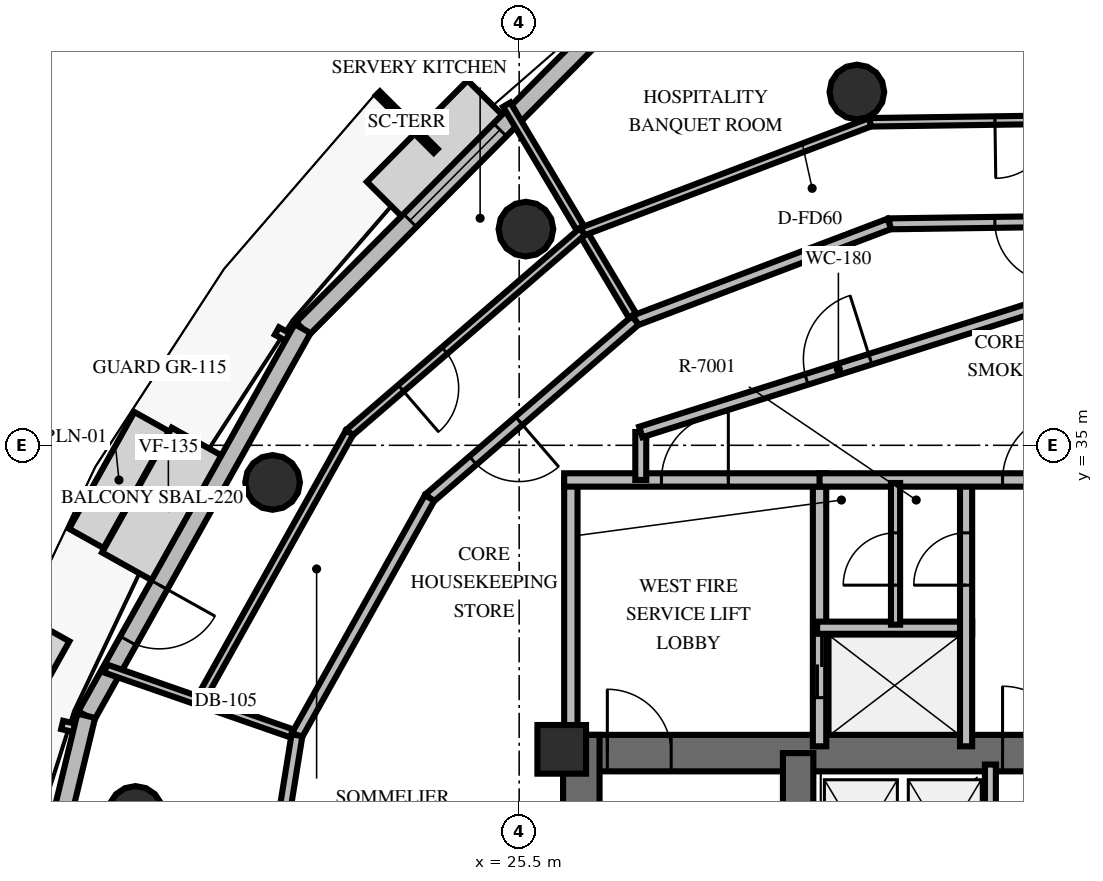
"""IFC4 building model, lengths in metres.
Left out: names, types, materials, properties, quantities, classifications, styles, units other than length and angle.
Written with IfcOpenShell. Run it as: python <this file> out.ifc"""

import sys

from ifc_helpers import new_model, si_unit, direction, frame, frame_2d, origin, origin_2d, place, context, subcontext, project, spatial, rectangle, circle, extrude, element, fill, save


model = new_model("IFC4")
c1 = context("Model", 3, precision=1e-05, world=origin(), true_north=direction((0.0, 1.0)))
c2 = subcontext(c1, "Body", "Model", "MODEL_VIEW")
j1 = project(units=[si_unit("LENGTHUNIT", "METRE"), si_unit("PLANEANGLEUNIT", "RADIAN")], contexts=[c1])
p1 = place(None, origin())
s1 = spatial("IfcSite", under=j1, at=p1, CompositionType="ELEMENT")
p2 = place(p1, origin())
s2 = spatial("IfcBuilding", under=s1, at=p2, CompositionType="ELEMENT")
p3 = place(p2, frame((0.0, 0.0, 280.8)))
s3 = spatial("IfcBuildingStorey", under=s2, at=p3, CompositionType="ELEMENT", Elevation=280.8)
p4 = place(p3, frame((26.222, 29.938, 0.0), z_axis=(0.0, 0.0, 1.0), x_axis=(1.0, 0.0, 0.0)))
e1 = element("IfcWall", 1, at=p4, inside=s3, PredefinedType="SHEAR", context=c2, shape_type="SweptSolid", body=[
    extrude(rectangle(XDim=15.566, YDim=0.6, at=frame_2d((7.783, 0.0))), origin(), (0.0, 0.0, 1.0), 3.6),
])
p5 = place(p4, frame((0.728, 0.0, 0.0)))
e2 = element("IfcOpeningElement", 2, at=p5, cuts=e1, PredefinedType="OPENING", context=c2, shape_type="SweptSolid", body=[
    extrude(rectangle(XDim=1.05, YDim=2.15, at=frame_2d((0.525, 1.075))), frame((0.0, 0.31, 0.0), z_axis=(0.0, -1.0, 0.0), x_axis=(1.0, 0.0, 0.0)), (0.0, 0.0, 1.0), 0.62),
])
p6 = place(p4, frame((13.778, 0.0, 0.0)))
e3 = element("IfcOpeningElement", 3, at=p6, cuts=e1, PredefinedType="OPENING", context=c2, shape_type="SweptSolid", body=[
    extrude(rectangle(XDim=1.05, YDim=2.15, at=frame_2d((0.525, 1.075))), frame((0.0, 0.31, 0.0), z_axis=(0.0, -1.0, 0.0), x_axis=(1.0, 0.0, 0.0)), (0.0, 0.0, 1.0), 0.62),
])
p7 = place(p4, frame((7.228, 0.0, 0.0)))
e4 = element("IfcOpeningElement", 4, at=p7, cuts=e1, PredefinedType="OPENING", context=c2, shape_type="SweptSolid", body=[
    extrude(rectangle(XDim=1.1, YDim=2.15, at=frame_2d((0.55, 1.075))), frame((0.0, 0.31, 0.0), z_axis=(0.0, -1.0, 0.0), x_axis=(1.0, 0.0, 0.0)), (0.0, 0.0, 1.0), 0.62),
])
p8 = place(p3, frame((26.522, 19.962, 0.0), z_axis=(0.0, 0.0, 1.0), x_axis=(0.0, 1.0, 0.0)))
e5 = element("IfcWall", 5, at=p8, inside=s3, PredefinedType="SHEAR", context=c2, shape_type="SweptSolid", body=[
    extrude(rectangle(XDim=10.276, YDim=0.6, at=frame_2d((5.138, 0.0))), origin(), (0.0, 0.0, 1.0), 3.6),
])
p9 = place(p3, frame((30.088, 20.262, 0.0), z_axis=(0.0, 0.0, 1.0), x_axis=(0.0, 1.0, 0.0)))
e6 = element("IfcWall", 6, at=p9, inside=s3, PredefinedType="SHEAR", context=c2, shape_type="SweptSolid", body=[
    extrude(rectangle(XDim=9.676, YDim=0.5, at=frame_2d((4.838, 0.0))), origin(), (0.0, 0.0, 1.0), 3.6),
])
p10 = place(p3, frame((26.2, 30.0, 0.0), z_axis=(0.0, 0.0, 1.0), x_axis=(1.0, 0.0, 0.0)))
e7 = element("IfcColumn", 7, at=p10, inside=s3, PredefinedType="PILASTER", context=c2, shape_type="SweptSolid", body=[
    extrude(rectangle(XDim=0.8, YDim=0.8, at=origin_2d()), origin(), (0.0, 0.0, 1.0), 3.6),
])
for number, where, z_axis, x_axis in (
    (8, (31.054, 40.81, 0.0), (0.0, 0.0, 1.0), (1.0, 0.0, 0.0)),
    (9, (25.611, 38.555, 0.0), (0.0, 0.0, 1.0), (1.0, 0.0, 0.0)),
    (10, (21.445, 34.389, 0.0), (0.0, 0.0, 1.0), (1.0, 0.0, 0.0)),
    (11, (19.19, 28.946, 0.0), (0.0, 0.0, 1.0), (1.0, 0.0, 0.0)),
):
    element("IfcColumn", number, at=place(p3, frame(where, z_axis=z_axis, x_axis=x_axis)), inside=s3, PredefinedType="COLUMN", context=c2, shape_type="SweptSolid", body=[
        extrude(circle(Radius=0.45, at=origin_2d()), origin(), (0.0, 0.0, 1.0), 3.6),
    ])
p11 = place(p3, frame((26.951, 41.968, 0.0), z_axis=(0.0, 0.0, 1.0), x_axis=(-0.704528696966, -0.709675499895, 0.0)))
e12 = element("IfcWall", 12, at=p11, inside=s3, PredefinedType="SOLIDWALL", context=c2, shape_type="SweptSolid", body=[
    extrude(rectangle(XDim=7.115, YDim=0.3, at=frame_2d((3.558, 0.0))), origin(), (0.0, 0.0, 1.0), 2.76),
])
p12 = place(p11, frame((2.508, 0.0, 0.8)))
e13 = element("IfcOpeningElement", 13, at=p12, cuts=e12, PredefinedType="OPENING", context=c2, shape_type="SweptSolid", body=[
    extrude(rectangle(XDim=2.1, YDim=1.85, at=frame_2d((1.05, 0.925))), frame((0.0, 0.16, 0.0), z_axis=(0.0, -1.0, 0.0), x_axis=(1.0, 0.0, 0.0)), (0.0, 0.0, 1.0), 0.32),
])
p13 = place(p3, frame((21.938, 36.918, 0.0), z_axis=(0.0, 0.0, 1.0), x_axis=(-0.487861120846, -0.872921260348, 0.0)))
e14 = element("IfcWall", 14, at=p13, inside=s3, PredefinedType="SOLIDWALL", context=c2, shape_type="SweptSolid", body=[
    extrude(rectangle(XDim=7.293, YDim=0.3, at=frame_2d((3.646, 0.0))), origin(), (0.0, 0.0, 1.0), 2.76),
])
p14 = place(p13, frame((4.83, 0.0, 0.0)))
e15 = element("IfcOpeningElement", 15, at=p14, cuts=e14, PredefinedType="OPENING", context=c2, shape_type="SweptSolid", body=[
    extrude(rectangle(XDim=1.05, YDim=2.15, at=frame_2d((0.525, 1.075))), frame((0.0, 0.16, 0.0), z_axis=(0.0, -1.0, 0.0), x_axis=(1.0, 0.0, 0.0)), (0.0, 0.0, 1.0), 0.32),
])
p15 = place(p3, frame((18.38, 30.552, 0.0), z_axis=(0.0, 0.0, 1.0), x_axis=(-0.235278882534, -0.971927902385, 0.0)))
e16 = element("IfcWall", 16, at=p15, inside=s3, PredefinedType="SOLIDWALL", context=c2, shape_type="SweptSolid", body=[
    extrude(rectangle(XDim=7.115, YDim=0.3, at=frame_2d((3.558, 0.0))), origin(), (0.0, 0.0, 1.0), 2.76),
])
p16 = place(p15, frame((2.508, 0.0, 0.8)))
e17 = element("IfcOpeningElement", 17, at=p16, cuts=e16, PredefinedType="OPENING", context=c2, shape_type="SweptSolid", body=[
    extrude(rectangle(XDim=2.1, YDim=1.85, at=frame_2d((1.05, 0.925))), frame((0.0, 0.16, 0.0), z_axis=(0.0, -1.0, 0.0), x_axis=(1.0, 0.0, 0.0)), (0.0, 0.0, 1.0), 0.32),
])
p17 = place(p3, frame((26.35, 30.05, 0.0), z_axis=(0.0, 0.0, 1.0), x_axis=(0.0, 1.0, 0.0)))
e18 = element("IfcWall", 18, at=p17, inside=s3, PredefinedType="SOLIDWALL", context=c2, shape_type="SweptSolid", body=[
    extrude(rectangle(XDim=4.38, YDim=0.22, at=frame_2d((2.19, 0.0))), origin(), (0.0, 0.0, 1.0), 2.46),
])
p18 = place(p3, frame((30.44, 30.05, 0.0), z_axis=(0.0, 0.0, 1.0), x_axis=(0.0, 1.0, 0.0)))
e19 = element("IfcWall", 19, at=p18, inside=s3, PredefinedType="SOLIDWALL", context=c2, shape_type="SweptSolid", body=[
    extrude(rectangle(XDim=4.38, YDim=0.22, at=frame_2d((2.19, 0.0))), origin(), (0.0, 0.0, 1.0), 2.46),
])
p19 = place(p18, frame((0.8, 0.0, 0.0)))
e20 = element("IfcOpeningElement", 20, at=p19, cuts=e19, PredefinedType="OPENING", context=c2, shape_type="SweptSolid", body=[
    extrude(rectangle(XDim=1.05, YDim=2.1, at=frame_2d((0.525, 1.05))), frame((0.0, 0.12, 0.0), z_axis=(0.0, -1.0, 0.0), x_axis=(1.0, 0.0, 0.0)), (0.0, 0.0, 1.0), 0.24),
])
p20 = place(p3, frame((26.24, 34.43, 0.0), z_axis=(0.0, 0.0, 1.0), x_axis=(1.0, 0.0, 0.0)))
e21 = element("IfcWall", 21, at=p20, inside=s3, PredefinedType="SOLIDWALL", context=c2, shape_type="SweptSolid", body=[
    extrude(rectangle(XDim=4.31, YDim=0.22, at=frame_2d((2.155, 0.0))), origin(), (0.0, 0.0, 1.0), 2.46),
])
p21 = place(p20, frame((1.6, 0.0, 0.0)))
e22 = element("IfcOpeningElement", 22, at=p21, cuts=e21, PredefinedType="OPENING", context=c2, shape_type="SweptSolid", body=[
    extrude(rectangle(XDim=1.1, YDim=2.15, at=frame_2d((0.55, 1.075))), frame((0.0, 0.12, 0.0), z_axis=(0.0, -1.0, 0.0), x_axis=(1.0, 0.0, 0.0)), (0.0, 0.0, 1.0), 0.24),
])
p22 = place(p3, frame((30.4, 32.0, 0.0), z_axis=(0.0, 0.0, 1.0), x_axis=(1.0, 0.0, 0.0)))
e23 = element("IfcWall", 23, at=p22, inside=s3, PredefinedType="SOLIDWALL", context=c2, shape_type="SweptSolid", body=[
    extrude(rectangle(XDim=2.55, YDim=0.2, at=frame_2d((1.275, 0.0))), origin(), (0.0, 0.0, 1.0), 2.46),
])
p23 = place(p3, frame((32.85, 30.05, 0.0), z_axis=(0.0, 0.0, 1.0), x_axis=(0.0, 1.0, 0.0)))
e24 = element("IfcWall", 24, at=p23, inside=s3, PredefinedType="SOLIDWALL", context=c2, shape_type="SweptSolid", body=[
    extrude(rectangle(XDim=4.38, YDim=0.2, at=frame_2d((2.19, 0.0))), origin(), (0.0, 0.0, 1.0), 2.46),
])
p24 = place(p23, frame((2.65, 0.0, 0.0)))
e25 = element("IfcOpeningElement", 25, at=p24, cuts=e24, PredefinedType="OPENING", context=c2, shape_type="SweptSolid", body=[
    extrude(rectangle(XDim=0.86, YDim=2.05, at=frame_2d((0.43, 1.025))), frame((0.0, 0.11, 0.0), z_axis=(0.0, -1.0, 0.0), x_axis=(1.0, 0.0, 0.0)), (0.0, 0.0, 1.0), 0.22),
])
p25 = place(p3, frame((30.44, 34.43, 0.0), z_axis=(0.0, 0.0, 1.0), x_axis=(1.0, 0.0, 0.0)))
e26 = element("IfcWall", 26, at=p25, inside=s3, PredefinedType="SOLIDWALL", context=c2, shape_type="SweptSolid", body=[
    extrude(rectangle(XDim=7.12, YDim=0.22, at=frame_2d((3.56, 0.0))), origin(), (0.0, 0.0, 1.0), 2.46),
])
p26 = place(p25, frame((3.01, 0.0, 0.0)))
e27 = element("IfcOpeningElement", 27, at=p26, cuts=e26, PredefinedType="OPENING", context=c2, shape_type="SweptSolid", body=[
    extrude(rectangle(XDim=1.1, YDim=2.15, at=frame_2d((0.55, 1.075))), frame((0.0, 0.12, 0.0), z_axis=(0.0, -1.0, 0.0), x_axis=(1.0, 0.0, 0.0)), (0.0, 0.0, 1.0), 0.24),
])
p27 = place(p3, frame((31.69, 32.05, 0.0), z_axis=(0.0, 0.0, 1.0), x_axis=(0.0, 1.0, 0.0)))
e28 = element("IfcWall", 28, at=p27, inside=s3, PredefinedType="PARTITIONING", context=c2, shape_type="SweptSolid", body=[
    extrude(rectangle(XDim=2.33, YDim=0.15, at=frame_2d((1.165, 0.0))), origin(), (0.0, 0.0, 1.0), 2.46),
])
p28 = place(p27, frame((0.65, 0.0, 0.0)))
e29 = element("IfcOpeningElement", 29, at=p28, cuts=e28, PredefinedType="OPENING", context=c2, shape_type="SweptSolid", body=[
    extrude(rectangle(XDim=0.86, YDim=2.05, at=frame_2d((0.43, 1.025))), frame((0.0, 0.085, 0.0), z_axis=(0.0, -1.0, 0.0), x_axis=(1.0, 0.0, 0.0)), (0.0, 0.0, 1.0), 0.17),
])
p29 = place(p3, frame((33.25, 27.28, 0.0), z_axis=(0.0, 0.0, 1.0), x_axis=(0.0, 1.0, 0.0)))
e30 = element("IfcWall", 30, at=p29, inside=s3, PredefinedType="SOLIDWALL", context=c2, shape_type="SweptSolid", body=[
    extrude(rectangle(XDim=2.47, YDim=0.18, at=frame_2d((1.235, 0.0))), origin(), (0.0, 0.0, 1.0), 2.46),
])
p30 = place(p3, frame((27.5, 34.43, 0.0), z_axis=(0.0, 0.0, 1.0), x_axis=(0.0, 1.0, 0.0)))
e31 = element("IfcWall", 31, at=p30, inside=s3, PredefinedType="PARTITIONING", context=c2, shape_type="SweptSolid", body=[
    extrude(rectangle(XDim=0.789, YDim=0.18, at=frame_2d((0.395, 0.0))), origin(), (0.0, 0.0, 1.0), 2.46),
])
p31 = place(p3, frame((27.5, 35.219, 0.0), z_axis=(0.0, 0.0, 1.0), x_axis=(0.953228121756, 0.302251795518, 0.0)))
e32 = element("IfcWall", 32, at=p31, inside=s3, PredefinedType="PARTITIONING", context=c2, shape_type="SweptSolid", body=[
    extrude(rectangle(XDim=6.819, YDim=0.18, at=frame_2d((3.409, 0.0))), origin(), (0.0, 0.0, 1.0), 2.46),
])
p32 = place(p31, frame((2.86, 0.0, 0.0)))
e33 = element("IfcOpeningElement", 33, at=p32, cuts=e32, PredefinedType="OPENING", context=c2, shape_type="SweptSolid", body=[
    extrude(rectangle(XDim=1.1, YDim=2.15, at=frame_2d((0.55, 1.075))), frame((0.0, 0.1, 0.0), z_axis=(0.0, -1.0, 0.0), x_axis=(1.0, 0.0, 0.0)), (0.0, 0.0, 1.0), 0.2),
])
p33 = place(p3, frame((27.41, 37.055, 0.0), z_axis=(0.0, 0.0, 1.0), x_axis=(-0.512015892625, 0.858975975042, 0.0)))
e34 = element("IfcWall", 34, at=p33, inside=s3, PredefinedType="PARTITIONING", context=c2, shape_type="SweptSolid", body=[
    extrude(rectangle(XDim=4.13, YDim=0.14, at=frame_2d((2.065, 0.0))), origin(), (0.0, 0.0, 1.0), 2.46),
])
p34 = place(p3, frame((36.058, 38.704, 0.0), z_axis=(0.0, 0.0, 1.0), x_axis=(-0.99990299363, -0.013928507778, 0.0)))
e35 = element("IfcWall", 35, at=p34, inside=s3, PredefinedType="PARTITIONING", context=c2, shape_type="SweptSolid", body=[
    extrude(rectangle(XDim=4.47, YDim=0.18, at=frame_2d((2.235, 0.0))), origin(), (0.0, 0.0, 1.0), 2.46),
])
p35 = place(p34, frame((1.735, 0.0, 0.0)))
e36 = element("IfcOpeningElement", 36, at=p35, cuts=e35, PredefinedType="OPENING", context=c2, shape_type="SweptSolid", body=[
    extrude(rectangle(XDim=1.0, YDim=2.15, at=frame_2d((0.5, 1.075))), frame((0.0, 0.1, 0.0), z_axis=(0.0, -1.0, 0.0), x_axis=(1.0, 0.0, 0.0)), (0.0, 0.0, 1.0), 0.2),
])
p36 = place(p3, frame((31.588, 38.642, 0.0), z_axis=(0.0, 0.0, 1.0), x_axis=(-0.934814409171, -0.355136622169, 0.0)))
e37 = element("IfcWall", 37, at=p36, inside=s3, PredefinedType="PARTITIONING", context=c2, shape_type="SweptSolid", body=[
    extrude(rectangle(XDim=4.47, YDim=0.18, at=frame_2d((2.235, 0.0))), origin(), (0.0, 0.0, 1.0), 2.46),
])
p37 = place(p3, frame((36.33, 40.383, 0.0), z_axis=(0.0, 0.0, 1.0), x_axis=(-0.999902780096, -0.013943828578, 0.0)))
e38 = element("IfcWall", 38, at=p37, inside=s3, PredefinedType="PARTITIONING", context=c2, shape_type="SweptSolid", body=[
    extrude(rectangle(XDim=5.06, YDim=0.14, at=frame_2d((2.53, 0.0))), origin(), (0.0, 0.0, 1.0), 2.46),
])
p38 = place(p37, frame((2.055, 0.0, 0.0)))
e39 = element("IfcOpeningElement", 39, at=p38, cuts=e38, PredefinedType="OPENING", context=c2, shape_type="SweptSolid", body=[
    extrude(rectangle(XDim=0.95, YDim=2.15, at=frame_2d((0.475, 1.075))), frame((0.0, 0.08, 0.0), z_axis=(0.0, -1.0, 0.0), x_axis=(1.0, 0.0, 0.0)), (0.0, 0.0, 1.0), 0.16),
])
p39 = place(p3, frame((31.27, 40.312, 0.0), z_axis=(0.0, 0.0, 1.0), x_axis=(-0.934813695118, -0.355138501743, 0.0)))
e40 = element("IfcWall", 40, at=p39, inside=s3, PredefinedType="PARTITIONING", context=c2, shape_type="SweptSolid", body=[
    extrude(rectangle(XDim=5.06, YDim=0.14, at=frame_2d((2.53, 0.0))), origin(), (0.0, 0.0, 1.0), 2.46),
])
p40 = place(p3, frame((21.846, 30.232, 0.0), z_axis=(0.0, 0.0, 1.0), x_axis=(-0.944377092618, 0.328864572338, 0.0)))
e41 = element("IfcWall", 41, at=p40, inside=s3, PredefinedType="PARTITIONING", context=c2, shape_type="SweptSolid", body=[
    extrude(rectangle(XDim=3.331, YDim=0.14, at=frame_2d((1.666, 0.0))), origin(), (0.0, 0.0, 1.0), 2.46),
])
p41 = place(p3, frame((27.41, 37.055, 0.0), z_axis=(0.0, 0.0, 1.0), x_axis=(-0.756992481262, -0.653423586438, 0.0)))
e42 = element("IfcWall", 42, at=p41, inside=s3, PredefinedType="PARTITIONING", context=c2, shape_type="SweptSolid", body=[
    extrude(rectangle(XDim=4.469, YDim=0.18, at=frame_2d((2.235, 0.0))), origin(), (0.0, 0.0, 1.0), 2.46),
])
p42 = place(p41, frame((2.527, 0.0, 0.0)))
e43 = element("IfcOpeningElement", 43, at=p42, cuts=e42, PredefinedType="OPENING", context=c2, shape_type="SweptSolid", body=[
    extrude(rectangle(XDim=1.0, YDim=2.15, at=frame_2d((0.5, 1.075))), frame((0.0, 0.1, 0.0), z_axis=(0.0, -1.0, 0.0), x_axis=(1.0, 0.0, 0.0)), (0.0, 0.0, 1.0), 0.2),
])
p43 = place(p3, frame((24.027, 34.134, 0.0), z_axis=(0.0, 0.0, 1.0), x_axis=(-0.487858082028, -0.872922958685, 0.0)))
e44 = element("IfcWall", 44, at=p43, inside=s3, PredefinedType="PARTITIONING", context=c2, shape_type="SweptSolid", body=[
    extrude(rectangle(XDim=4.47, YDim=0.18, at=frame_2d((2.235, 0.0))), origin(), (0.0, 0.0, 1.0), 2.46),
])
p44 = place(p3, frame((26.54, 38.515, 0.0), z_axis=(0.0, 0.0, 1.0), x_axis=(-0.757024760465, -0.653386189051, 0.0)))
e45 = element("IfcWall", 45, at=p44, inside=s3, PredefinedType="PARTITIONING", context=c2, shape_type="SweptSolid", body=[
    extrude(rectangle(XDim=5.06, YDim=0.14, at=frame_2d((2.53, 0.0))), origin(), (0.0, 0.0, 1.0), 2.46),
])
p45 = place(p44, frame((2.992, 0.0, 0.0)))
e46 = element("IfcOpeningElement", 46, at=p45, cuts=e45, PredefinedType="OPENING", context=c2, shape_type="SweptSolid", body=[
    extrude(rectangle(XDim=0.95, YDim=2.15, at=frame_2d((0.475, 1.075))), frame((0.0, 0.08, 0.0), z_axis=(0.0, -1.0, 0.0), x_axis=(1.0, 0.0, 0.0)), (0.0, 0.0, 1.0), 0.16),
])
p46 = place(p3, frame((22.709, 35.209, 0.0), z_axis=(0.0, 0.0, 1.0), x_axis=(-0.487828927105, -0.872939252113, 0.0)))
e47 = element("IfcWall", 47, at=p46, inside=s3, PredefinedType="PARTITIONING", context=c2, shape_type="SweptSolid", body=[
    extrude(rectangle(XDim=5.06, YDim=0.14, at=frame_2d((2.53, 0.0))), origin(), (0.0, 0.0, 1.0), 2.46),
])
p47 = place(p3, frame((21.846, 30.232, 0.0), z_axis=(0.0, 0.0, 1.0), x_axis=(-0.159879840986, -0.987136483191, 0.0)))
e48 = element("IfcWall", 48, at=p47, inside=s3, PredefinedType="PARTITIONING", context=c2, shape_type="SweptSolid", body=[
    extrude(rectangle(XDim=4.469, YDim=0.18, at=frame_2d((2.235, 0.0))), origin(), (0.0, 0.0, 1.0), 2.46),
])
p48 = place(p12, origin())
e49 = element("IfcWindow", 49, at=p48, inside=s3, PartitioningType="SINGLE_PANEL", PredefinedType="WINDOW", context=c2, shape_type="SweptSolid", body=[
    extrude(rectangle(XDim=2.1, YDim=1.85, at=frame_2d((1.05, 0.925))), frame((0.0, 0.03, 0.0), z_axis=(0.0, -1.0, 0.0), x_axis=(1.0, 0.0, 0.0)), (0.0, 0.0, 1.0), 0.06),
])
fill(e13, e49)
p49 = place(p14, origin())
e50 = element("IfcDoor", 50, at=p49, inside=s3, OperationType="SINGLE_SWING_LEFT", PredefinedType="DOOR", context=c2, shape_type="SweptSolid", body=[
    extrude(rectangle(XDim=1.05, YDim=2.15, at=frame_2d((0.525, 1.075))), frame((0.0, 0.025, 0.0), z_axis=(0.0, -1.0, 0.0), x_axis=(1.0, 0.0, 0.0)), (0.0, 0.0, 1.0), 0.05),
])
fill(e15, e50)
p50 = place(p5, origin())
e51 = element("IfcDoor", 51, at=p50, inside=s3, OperationType="SINGLE_SWING_LEFT", PredefinedType="DOOR", context=c2, shape_type="SweptSolid", body=[
    extrude(rectangle(XDim=1.05, YDim=2.15, at=frame_2d((0.525, 1.075))), frame((0.0, 0.025, 0.0), z_axis=(0.0, -1.0, 0.0), x_axis=(1.0, 0.0, 0.0)), (0.0, 0.0, 1.0), 0.05),
])
fill(e2, e51)
p51 = place(p7, origin())
e52 = element("IfcDoor", 52, at=p51, inside=s3, OperationType="SINGLE_SWING_LEFT", PredefinedType="DOOR", context=c2, shape_type="SweptSolid", body=[
    extrude(rectangle(XDim=1.1, YDim=2.15, at=frame_2d((0.55, 1.075))), frame((0.0, 0.025, 0.0), z_axis=(0.0, -1.0, 0.0), x_axis=(1.0, 0.0, 0.0)), (0.0, 0.0, 1.0), 0.05),
])
fill(e4, e52)
p52 = place(p21, origin())
e53 = element("IfcDoor", 53, at=p52, inside=s3, OperationType="SINGLE_SWING_RIGHT", PredefinedType="DOOR", context=c2, shape_type="SweptSolid", body=[
    extrude(rectangle(XDim=1.1, YDim=2.15, at=frame_2d((0.55, 1.075))), frame((0.0, 0.025, 0.0), z_axis=(0.0, -1.0, 0.0), x_axis=(1.0, 0.0, 0.0)), (0.0, 0.0, 1.0), 0.05),
])
fill(e22, e53)
p53 = place(p19, origin())
e54 = element("IfcDoor", 54, at=p53, inside=s3, OperationType="DOUBLE_DOOR_SLIDING", PredefinedType="USERDEFINED", context=c2, shape_type="SweptSolid", body=[
    extrude(rectangle(XDim=1.05, YDim=2.1, at=frame_2d((0.525, 1.05))), frame((0.0, 0.025, 0.0), z_axis=(0.0, -1.0, 0.0), x_axis=(1.0, 0.0, 0.0)), (0.0, 0.0, 1.0), 0.05),
])
fill(e20, e54)
p54 = place(p24, origin())
e55 = element("IfcDoor", 55, at=p54, inside=s3, OperationType="SINGLE_SWING_LEFT", PredefinedType="TRAPDOOR", context=c2, shape_type="SweptSolid", body=[
    extrude(rectangle(XDim=0.86, YDim=2.05, at=frame_2d((0.43, 1.025))), frame((0.0, 0.025, 0.0), z_axis=(0.0, -1.0, 0.0), x_axis=(1.0, 0.0, 0.0)), (0.0, 0.0, 1.0), 0.05),
])
fill(e25, e55)
p55 = place(p26, origin())
e56 = element("IfcDoor", 56, at=p55, inside=s3, OperationType="SINGLE_SWING_RIGHT", PredefinedType="DOOR", context=c2, shape_type="SweptSolid", body=[
    extrude(rectangle(XDim=1.1, YDim=2.15, at=frame_2d((0.55, 1.075))), frame((0.0, 0.025, 0.0), z_axis=(0.0, -1.0, 0.0), x_axis=(1.0, 0.0, 0.0)), (0.0, 0.0, 1.0), 0.05),
])
fill(e27, e56)
p56 = place(p28, origin())
e57 = element("IfcDoor", 57, at=p56, inside=s3, OperationType="SINGLE_SWING_LEFT", PredefinedType="TRAPDOOR", context=c2, shape_type="SweptSolid", body=[
    extrude(rectangle(XDim=0.86, YDim=2.05, at=frame_2d((0.43, 1.025))), frame((0.0, 0.025, 0.0), z_axis=(0.0, -1.0, 0.0), x_axis=(1.0, 0.0, 0.0)), (0.0, 0.0, 1.0), 0.05),
])
fill(e29, e57)
p57 = place(p32, origin())
e58 = element("IfcDoor", 58, at=p57, inside=s3, OperationType="SINGLE_SWING_RIGHT", PredefinedType="DOOR", context=c2, shape_type="SweptSolid", body=[
    extrude(rectangle(XDim=1.1, YDim=2.15, at=frame_2d((0.55, 1.075))), frame((0.0, 0.025, 0.0), z_axis=(0.0, -1.0, 0.0), x_axis=(1.0, 0.0, 0.0)), (0.0, 0.0, 1.0), 0.05),
])
fill(e33, e58)
p58 = place(p35, origin())
e59 = element("IfcDoor", 59, at=p58, inside=s3, OperationType="SINGLE_SWING_LEFT", PredefinedType="DOOR", context=c2, shape_type="SweptSolid", body=[
    extrude(rectangle(XDim=1.0, YDim=2.15, at=frame_2d((0.5, 1.075))), frame((0.0, 0.025, 0.0), z_axis=(0.0, -1.0, 0.0), x_axis=(1.0, 0.0, 0.0)), (0.0, 0.0, 1.0), 0.05),
])
fill(e36, e59)
p59 = place(p38, origin())
e60 = element("IfcDoor", 60, at=p59, inside=s3, OperationType="SINGLE_SWING_RIGHT", PredefinedType="DOOR", context=c2, shape_type="SweptSolid", body=[
    extrude(rectangle(XDim=0.95, YDim=2.15, at=frame_2d((0.475, 1.075))), frame((0.0, 0.025, 0.0), z_axis=(0.0, -1.0, 0.0), x_axis=(1.0, 0.0, 0.0)), (0.0, 0.0, 1.0), 0.05),
])
fill(e39, e60)
p60 = place(p42, origin())
e61 = element("IfcDoor", 61, at=p60, inside=s3, OperationType="SINGLE_SWING_LEFT", PredefinedType="DOOR", context=c2, shape_type="SweptSolid", body=[
    extrude(rectangle(XDim=1.0, YDim=2.15, at=frame_2d((0.5, 1.075))), frame((0.0, 0.025, 0.0), z_axis=(0.0, -1.0, 0.0), x_axis=(1.0, 0.0, 0.0)), (0.0, 0.0, 1.0), 0.05),
])
fill(e43, e61)
p61 = place(p45, origin())
e62 = element("IfcDoor", 62, at=p61, inside=s3, OperationType="SINGLE_SWING_RIGHT", PredefinedType="DOOR", context=c2, shape_type="SweptSolid", body=[
    extrude(rectangle(XDim=0.95, YDim=2.15, at=frame_2d((0.475, 1.075))), frame((0.0, 0.025, 0.0), z_axis=(0.0, -1.0, 0.0), x_axis=(1.0, 0.0, 0.0)), (0.0, 0.0, 1.0), 0.05),
])
fill(e46, e62)
save(model, sys.argv[1])
